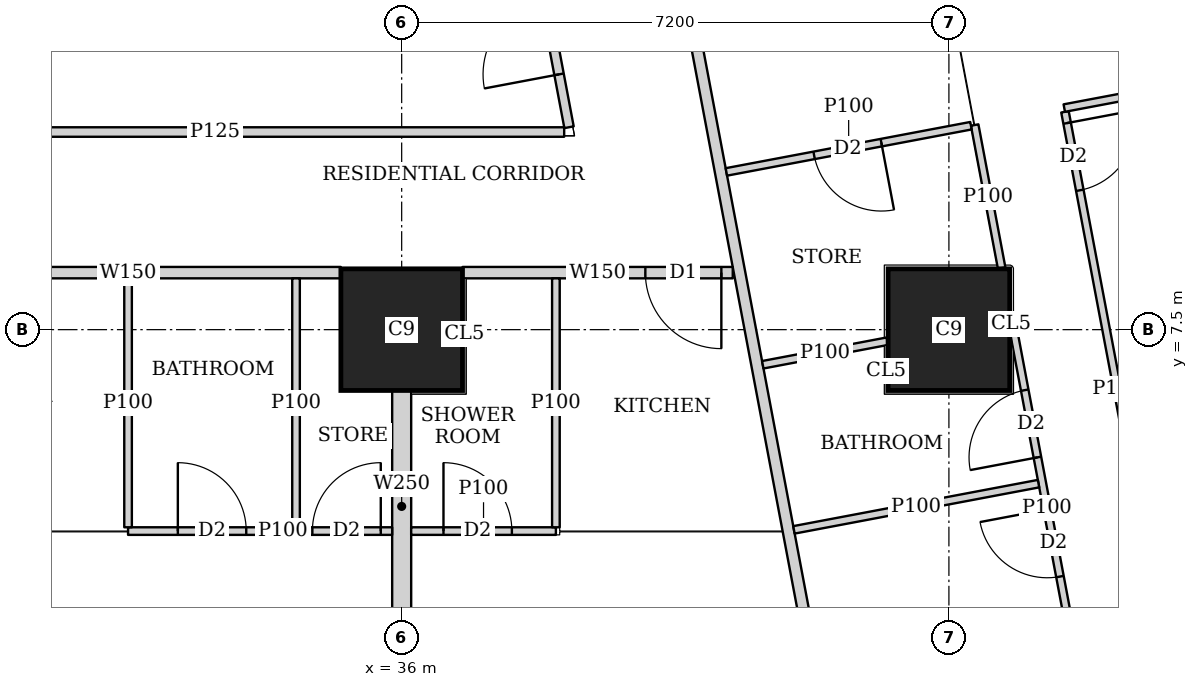
"""IFC4 building model, lengths in metres.
Left out: names, types, materials, properties, quantities, classifications, styles, units other than length and angle.
Written with IfcOpenShell. Run it as: python <this file> out.ifc"""

import sys

from ifc_helpers import new_model, si_unit, direction, frame, frame_2d, origin, origin_2d, place, context, subcontext, project, spatial, rectangle, extrude, element, fill, save


model = new_model("IFC4")
c1 = context("Model", 3, precision=1e-05, world=origin(), true_north=direction((0.0, 1.0)))
c2 = subcontext(c1, "Body", "Model", "MODEL_VIEW")
j1 = project(units=[si_unit("LENGTHUNIT", "METRE"), si_unit("PLANEANGLEUNIT", "RADIAN")], contexts=[c1])
p1 = place(None, origin())
s1 = spatial("IfcSite", under=j1, at=p1, CompositionType="ELEMENT")
p2 = place(p1, origin())
s2 = spatial("IfcBuilding", under=s1, at=p2, CompositionType="ELEMENT")
p3 = place(p2, frame((0.0, 0.0, 122.9)))
s3 = spatial("IfcBuildingStorey", under=s2, at=p3, CompositionType="ELEMENT", Elevation=122.9)
for number, where, z_axis, x_axis in (
    (1, (36.0, 7.5, 0.0), (0.0, 0.0, 1.0), (1.0, 0.0, 0.0)),
    (2, (43.2, 7.5, 0.0), (0.0, 0.0, 1.0), (1.0, 0.0, 0.0)),
):
    element("IfcColumn", number, at=place(p3, frame(where, z_axis=z_axis, x_axis=x_axis)), inside=s3, PredefinedType="COLUMN", context=c2, shape_type="SweptSolid", body=[
        extrude(rectangle(XDim=1.6, YDim=1.6, at=origin_2d()), origin(), (0.0, 0.0, 1.0), 3.75),
    ])
p4 = place(p3, frame((50.653, 2.703, 0.0), z_axis=(0.0, 0.0, 1.0), x_axis=(-0.185612026696, 0.982623109613, 0.0)))
e3 = element("IfcWall", 3, at=p4, inside=s3, PredefinedType="SOLIDWALL", context=c2, shape_type="SweptSolid", body=[
    extrude(rectangle(XDim=41.393, YDim=0.2, at=frame_2d((20.697, 0.0))), origin(), (0.0, 0.0, 1.0), 3.5),
])
p5 = place(p4, frame((1.633, 0.0, 0.9)))
e4 = element("IfcOpeningElement", 4, at=p5, cuts=e3, PredefinedType="OPENING", context=c2, shape_type="SweptSolid", body=[
    extrude(rectangle(XDim=1.8, YDim=1.5, at=frame_2d((0.9, 0.75))), frame((0.0, 0.11, 0.0), z_axis=(0.0, -1.0, 0.0), x_axis=(1.0, 0.0, 0.0)), (0.0, 0.0, 1.0), 0.22),
])
p6 = place(p4, frame((6.032, 0.0, 0.9)))
e5 = element("IfcOpeningElement", 5, at=p6, cuts=e3, PredefinedType="OPENING", context=c2, shape_type="SweptSolid", body=[
    extrude(rectangle(XDim=1.8, YDim=1.5, at=frame_2d((0.9, 0.75))), frame((0.0, 0.11, 0.0), z_axis=(0.0, -1.0, 0.0), x_axis=(1.0, 0.0, 0.0)), (0.0, 0.0, 1.0), 0.22),
])
p7 = place(p4, frame((9.848, 0.0, 0.9)))
e6 = element("IfcOpeningElement", 6, at=p7, cuts=e3, PredefinedType="OPENING", context=c2, shape_type="SweptSolid", body=[
    extrude(rectangle(XDim=1.8, YDim=1.5, at=frame_2d((0.9, 0.75))), frame((0.0, 0.11, 0.0), z_axis=(0.0, -1.0, 0.0), x_axis=(1.0, 0.0, 0.0)), (0.0, 0.0, 1.0), 0.22),
])
p8 = place(p4, frame((13.664, 0.0, 0.9)))
e7 = element("IfcOpeningElement", 7, at=p8, cuts=e3, PredefinedType="OPENING", context=c2, shape_type="SweptSolid", body=[
    extrude(rectangle(XDim=1.8, YDim=1.5, at=frame_2d((0.9, 0.75))), frame((0.0, 0.11, 0.0), z_axis=(0.0, -1.0, 0.0), x_axis=(1.0, 0.0, 0.0)), (0.0, 0.0, 1.0), 0.22),
])
p9 = place(p4, frame((17.481, 0.0, 0.9)))
e8 = element("IfcOpeningElement", 8, at=p9, cuts=e3, PredefinedType="OPENING", context=c2, shape_type="SweptSolid", body=[
    extrude(rectangle(XDim=1.8, YDim=1.5, at=frame_2d((0.9, 0.75))), frame((0.0, 0.11, 0.0), z_axis=(0.0, -1.0, 0.0), x_axis=(1.0, 0.0, 0.0)), (0.0, 0.0, 1.0), 0.22),
])
p10 = place(p4, frame((21.297, 0.0, 0.9)))
e9 = element("IfcOpeningElement", 9, at=p10, cuts=e3, PredefinedType="OPENING", context=c2, shape_type="SweptSolid", body=[
    extrude(rectangle(XDim=1.8, YDim=1.5, at=frame_2d((0.9, 0.75))), frame((0.0, 0.11, 0.0), z_axis=(0.0, -1.0, 0.0), x_axis=(1.0, 0.0, 0.0)), (0.0, 0.0, 1.0), 0.22),
])
p11 = place(p4, frame((25.113, 0.0, 0.9)))
e10 = element("IfcOpeningElement", 10, at=p11, cuts=e3, PredefinedType="OPENING", context=c2, shape_type="SweptSolid", body=[
    extrude(rectangle(XDim=1.8, YDim=1.5, at=frame_2d((0.9, 0.75))), frame((0.0, 0.11, 0.0), z_axis=(0.0, -1.0, 0.0), x_axis=(1.0, 0.0, 0.0)), (0.0, 0.0, 1.0), 0.22),
])
p12 = place(p4, frame((28.93, 0.0, 0.9)))
e11 = element("IfcOpeningElement", 11, at=p12, cuts=e3, PredefinedType="OPENING", context=c2, shape_type="SweptSolid", body=[
    extrude(rectangle(XDim=1.8, YDim=1.5, at=frame_2d((0.9, 0.75))), frame((0.0, 0.11, 0.0), z_axis=(0.0, -1.0, 0.0), x_axis=(1.0, 0.0, 0.0)), (0.0, 0.0, 1.0), 0.22),
])
p13 = place(p4, frame((32.746, 0.0, 0.9)))
e12 = element("IfcOpeningElement", 12, at=p13, cuts=e3, PredefinedType="OPENING", context=c2, shape_type="SweptSolid", body=[
    extrude(rectangle(XDim=1.8, YDim=1.5, at=frame_2d((0.9, 0.75))), frame((0.0, 0.11, 0.0), z_axis=(0.0, -1.0, 0.0), x_axis=(1.0, 0.0, 0.0)), (0.0, 0.0, 1.0), 0.22),
])
p14 = place(p4, frame((36.481, 0.0, 0.9)))
e13 = element("IfcOpeningElement", 13, at=p14, cuts=e3, PredefinedType="OPENING", context=c2, shape_type="SweptSolid", body=[
    extrude(rectangle(XDim=1.8, YDim=1.5, at=frame_2d((0.9, 0.75))), frame((0.0, 0.11, 0.0), z_axis=(0.0, -1.0, 0.0), x_axis=(1.0, 0.0, 0.0)), (0.0, 0.0, 1.0), 0.22),
])
p15 = place(p3, frame((40.356, 8.25, 0.0), z_axis=(0.0, 0.0, 1.0), x_axis=(-1.0, 0.0, 0.0)))
e14 = element("IfcWall", 14, at=p15, inside=s3, PredefinedType="SOLIDWALL", context=c2, shape_type="SweptSolid", body=[
    extrude(rectangle(XDim=3.555, YDim=0.15, at=frame_2d((1.777, 0.0))), origin(), (0.0, 0.0, 1.0), 3.5),
])
p16 = place(p15, frame((0.15, 0.0, 0.0)))
e15 = element("IfcOpeningElement", 15, at=p16, cuts=e14, PredefinedType="OPENING", context=c2, shape_type="SweptSolid", body=[
    extrude(rectangle(XDim=1.0, YDim=2.1, at=frame_2d((0.5, 1.05))), frame((0.0, 0.085, 0.0), z_axis=(0.0, -1.0, 0.0), x_axis=(1.0, 0.0, 0.0)), (0.0, 0.0, 1.0), 0.17),
])
p17 = place(p3, frame((35.199, 8.25, 0.0), z_axis=(0.0, 0.0, 1.0), x_axis=(-1.0, 0.0, 0.0)))
e16 = element("IfcWall", 16, at=p17, inside=s3, PredefinedType="SOLIDWALL", context=c2, shape_type="SweptSolid", body=[
    extrude(rectangle(XDim=5.598, YDim=0.15, at=frame_2d((2.799, 0.0))), origin(), (0.0, 0.0, 1.0), 3.5),
])
p18 = place(p17, frame((3.899, 0.0, 0.0)))
e17 = element("IfcOpeningElement", 17, at=p18, cuts=e16, PredefinedType="OPENING", context=c2, shape_type="SweptSolid", body=[
    extrude(rectangle(XDim=1.0, YDim=2.1, at=frame_2d((0.5, 1.05))), frame((0.0, 0.085, 0.0), z_axis=(0.0, -1.0, 0.0), x_axis=(1.0, 0.0, 0.0)), (0.0, 0.0, 1.0), 0.17),
])
p19 = place(p3, frame((33.382, 45.65, 0.0), z_axis=(0.0, 0.0, 1.0), x_axis=(0.185593544777, -0.982626600565, 0.0)))
e18 = element("IfcWall", 18, at=p19, inside=s3, PredefinedType="SOLIDWALL", context=c2, shape_type="SweptSolid", body=[
    extrude(rectangle(XDim=47.118, YDim=0.15, at=frame_2d((23.559, 0.0))), origin(), (0.0, 0.0, 1.0), 2.2),
])
p20 = place(p19, frame((10.662, 0.0, 0.0)))
e19 = element("IfcOpeningElement", 19, at=p20, cuts=e18, PredefinedType="OPENING", context=c2, shape_type="SweptSolid", body=[
    extrude(rectangle(XDim=1.0, YDim=2.1, at=frame_2d((0.5, 1.05))), frame((0.0, 0.085, 0.0), z_axis=(0.0, -1.0, 0.0), x_axis=(1.0, 0.0, 0.0)), (0.0, 0.0, 1.0), 0.17),
])
p21 = place(p19, frame((15.237, 0.0, 0.0)))
e20 = element("IfcOpeningElement", 20, at=p21, cuts=e18, PredefinedType="OPENING", context=c2, shape_type="SweptSolid", body=[
    extrude(rectangle(XDim=1.0, YDim=2.1, at=frame_2d((0.5, 1.05))), frame((0.0, 0.085, 0.0), z_axis=(0.0, -1.0, 0.0), x_axis=(1.0, 0.0, 0.0)), (0.0, 0.0, 1.0), 0.17),
])
p22 = place(p19, frame((22.87, 0.0, 0.0)))
e21 = element("IfcOpeningElement", 21, at=p22, cuts=e18, PredefinedType="OPENING", context=c2, shape_type="SweptSolid", body=[
    extrude(rectangle(XDim=1.0, YDim=2.1, at=frame_2d((0.5, 1.05))), frame((0.0, 0.085, 0.0), z_axis=(0.0, -1.0, 0.0), x_axis=(1.0, 0.0, 0.0)), (0.0, 0.0, 1.0), 0.17),
])
p23 = place(p19, frame((33.833, 0.0, 0.0)))
e22 = element("IfcOpeningElement", 22, at=p23, cuts=e18, PredefinedType="OPENING", context=c2, shape_type="SweptSolid", body=[
    extrude(rectangle(XDim=1.0, YDim=2.1, at=frame_2d((0.5, 1.05))), frame((0.0, 0.085, 0.0), z_axis=(0.0, -1.0, 0.0), x_axis=(1.0, 0.0, 0.0)), (0.0, 0.0, 1.0), 0.17),
])
p24 = place(p3, frame((35.875, 4.85, 0.0), z_axis=(0.0, 0.0, 1.0), x_axis=(-1.0, 0.0, 0.0)))
e23 = element("IfcWall", 23, at=p24, inside=s3, PredefinedType="PARTITIONING", context=c2, shape_type="SweptSolid", body=[
    extrude(rectangle(XDim=3.475, YDim=0.1, at=frame_2d((1.738, 0.0))), origin(), (0.0, 0.0, 1.0), 3.5),
])
p25 = place(p24, frame((1.92, 0.0, 0.0)))
e24 = element("IfcOpeningElement", 24, at=p25, cuts=e23, PredefinedType="OPENING", context=c2, shape_type="SweptSolid", body=[
    extrude(rectangle(XDim=0.9, YDim=2.1, at=frame_2d((0.45, 1.05))), frame((0.0, 0.06, 0.0), z_axis=(0.0, -1.0, 0.0), x_axis=(1.0, 0.0, 0.0)), (0.0, 0.0, 1.0), 0.12),
])
p26 = place(p24, frame((0.15, 0.0, 0.0)))
e25 = element("IfcOpeningElement", 25, at=p26, cuts=e23, PredefinedType="OPENING", context=c2, shape_type="SweptSolid", body=[
    extrude(rectangle(XDim=0.9, YDim=2.1, at=frame_2d((0.45, 1.05))), frame((0.0, 0.06, 0.0), z_axis=(0.0, -1.0, 0.0), x_axis=(1.0, 0.0, 0.0)), (0.0, 0.0, 1.0), 0.12),
])
for number, where, z_axis, x_axis in (
    (26, (32.4, 4.9, 0.0), (0.0, 0.0, 1.0), (0.0, 1.0, 0.0)),
    (27, (34.61, 4.9, 0.0), (0.0, 0.0, 1.0), (0.0, 1.0, 0.0)),
):
    element("IfcWall", number, at=place(p3, frame(where, z_axis=z_axis, x_axis=x_axis)), inside=s3, PredefinedType="PARTITIONING", context=c2, shape_type="SweptSolid", body=[
        extrude(rectangle(XDim=3.275, YDim=0.1, at=frame_2d((1.638, 0.0))), origin(), (0.0, 0.0, 1.0), 3.5),
    ])
p27 = place(p3, frame((38.029, 4.85, 0.0), z_axis=(0.0, 0.0, 1.0), x_axis=(-1.0, 0.0, 0.0)))
e28 = element("IfcWall", 28, at=p27, inside=s3, PredefinedType="PARTITIONING", context=c2, shape_type="SweptSolid", body=[
    extrude(rectangle(XDim=1.904, YDim=0.1, at=frame_2d((0.952, 0.0))), origin(), (0.0, 0.0, 1.0), 3.5),
])
p28 = place(p27, frame((0.579, 0.0, 0.0)))
e29 = element("IfcOpeningElement", 29, at=p28, cuts=e28, PredefinedType="OPENING", context=c2, shape_type="SweptSolid", body=[
    extrude(rectangle(XDim=0.9, YDim=2.1, at=frame_2d((0.45, 1.05))), frame((0.0, 0.06, 0.0), z_axis=(0.0, -1.0, 0.0), x_axis=(1.0, 0.0, 0.0)), (0.0, 0.0, 1.0), 0.12),
])
p29 = place(p3, frame((38.029, 4.9, 0.0), z_axis=(0.0, 0.0, 1.0), x_axis=(0.0, 1.0, 0.0)))
e30 = element("IfcWall", 30, at=p29, inside=s3, PredefinedType="PARTITIONING", context=c2, shape_type="SweptSolid", body=[
    extrude(rectangle(XDim=3.275, YDim=0.1, at=frame_2d((1.638, 0.0))), origin(), (0.0, 0.0, 1.0), 3.5),
])
p30 = place(p3, frame((36.0, 3.65, 0.0), z_axis=(0.0, 0.0, 1.0), x_axis=(0.0, 1.0, 0.0)))
e31 = element("IfcWall", 31, at=p30, inside=s3, PredefinedType="SOLIDWALL", context=c2, shape_type="SweptSolid", body=[
    extrude(rectangle(XDim=3.049, YDim=0.25, at=frame_2d((1.524, 0.0))), origin(), (0.0, 0.0, 1.0), 3.5),
])
p31 = place(p3, frame((44.727, 10.366, 0.0), z_axis=(0.0, 0.0, 1.0), x_axis=(0.185678775129, -0.982610498858, 0.0)))
e32 = element("IfcWall", 32, at=p31, inside=s3, PredefinedType="PARTITIONING", context=c2, shape_type="SweptSolid", body=[
    extrude(rectangle(XDim=7.421, YDim=0.1, at=frame_2d((3.71, 0.0))), origin(), (0.0, 0.0, 1.0), 3.5),
])
p32 = place(p31, frame((0.151, 0.0, 0.0)))
e33 = element("IfcOpeningElement", 33, at=p32, cuts=e32, PredefinedType="OPENING", context=c2, shape_type="SweptSolid", body=[
    extrude(rectangle(XDim=0.9, YDim=2.1, at=frame_2d((0.45, 1.05))), frame((0.0, 0.06, 0.0), z_axis=(0.0, -1.0, 0.0), x_axis=(1.0, 0.0, 0.0)), (0.0, 0.0, 1.0), 0.12),
])
p33 = place(p31, frame((4.55, 0.0, 0.0)))
e34 = element("IfcOpeningElement", 34, at=p33, cuts=e32, PredefinedType="OPENING", context=c2, shape_type="SweptSolid", body=[
    extrude(rectangle(XDim=0.9, YDim=2.1, at=frame_2d((0.45, 1.05))), frame((0.0, 0.06, 0.0), z_axis=(0.0, -1.0, 0.0), x_axis=(1.0, 0.0, 0.0)), (0.0, 0.0, 1.0), 0.12),
])
p34 = place(p3, frame((43.539, 10.192, 0.0), z_axis=(0.0, 0.0, 1.0), x_axis=(0.185366049966, -0.982669541362, 0.0)))
e35 = element("IfcWall", 35, at=p34, inside=s3, PredefinedType="PARTITIONING", context=c2, shape_type="SweptSolid", body=[
    extrude(rectangle(XDim=1.915, YDim=0.1, at=frame_2d((0.958, 0.0))), origin(), (0.0, 0.0, 1.0), 3.5),
])
p35 = place(p3, frame((44.049, 7.49, 0.0), z_axis=(0.0, 0.0, 1.0), x_axis=(0.185666332607, -0.982612849975, 0.0)))
e36 = element("IfcWall", 36, at=p35, inside=s3, PredefinedType="PARTITIONING", context=c2, shape_type="SweptSolid", body=[
    extrude(rectangle(XDim=4.75, YDim=0.1, at=frame_2d((2.375, 0.0))), origin(), (0.0, 0.0, 1.0), 3.5),
])
p36 = place(p35, frame((0.8, 0.0, 0.0)))
e37 = element("IfcOpeningElement", 37, at=p36, cuts=e36, PredefinedType="OPENING", context=c2, shape_type="SweptSolid", body=[
    extrude(rectangle(XDim=0.9, YDim=2.1, at=frame_2d((0.45, 1.05))), frame((0.0, 0.06, 0.0), z_axis=(0.0, -1.0, 0.0), x_axis=(1.0, 0.0, 0.0)), (0.0, 0.0, 1.0), 0.12),
])
p37 = place(p35, frame((2.396, 0.0, 0.0)))
e38 = element("IfcOpeningElement", 38, at=p37, cuts=e36, PredefinedType="OPENING", context=c2, shape_type="SweptSolid", body=[
    extrude(rectangle(XDim=0.9, YDim=2.1, at=frame_2d((0.45, 1.05))), frame((0.0, 0.06, 0.0), z_axis=(0.0, -1.0, 0.0), x_axis=(1.0, 0.0, 0.0)), (0.0, 0.0, 1.0), 0.12),
])
p38 = place(p3, frame((48.943, 11.213, 0.0), z_axis=(0.0, 0.0, 1.0), x_axis=(-0.982633535512, -0.185556823879, 0.0)))
e39 = element("IfcWall", 39, at=p38, inside=s3, PredefinedType="PARTITIONING", context=c2, shape_type="SweptSolid", body=[
    extrude(rectangle(XDim=4.3, YDim=0.1, at=frame_2d((2.15, 0.0))), origin(), (0.0, 0.0, 1.0), 2.2),
])
p39 = place(p3, frame((43.49, 10.183, 0.0), z_axis=(0.0, 0.0, 1.0), x_axis=(-0.982607026909, -0.185697147715, 0.0)))
e40 = element("IfcWall", 40, at=p39, inside=s3, PredefinedType="PARTITIONING", context=c2, shape_type="SweptSolid", body=[
    extrude(rectangle(XDim=3.275, YDim=0.1, at=frame_2d((1.637, 0.0))), origin(), (0.0, 0.0, 1.0), 3.5),
])
p40 = place(p39, frame((1.2, 0.0, 0.0)))
e41 = element("IfcOpeningElement", 41, at=p40, cuts=e40, PredefinedType="OPENING", context=c2, shape_type="SweptSolid", body=[
    extrude(rectangle(XDim=0.9, YDim=2.1, at=frame_2d((0.45, 1.05))), frame((0.0, 0.06, 0.0), z_axis=(0.0, -1.0, 0.0), x_axis=(1.0, 0.0, 0.0)), (0.0, 0.0, 1.0), 0.12),
])
p41 = place(p3, frame((42.39, 7.348, 0.0), z_axis=(0.0, 0.0, 1.0), x_axis=(-0.9825976927, -0.185746532405, 0.0)))
e42 = element("IfcWall", 42, at=p41, inside=s3, PredefinedType="PARTITIONING", context=c2, shape_type="SweptSolid", body=[
    extrude(rectangle(XDim=1.668, YDim=0.1, at=frame_2d((0.834, 0.0))), origin(), (0.0, 0.0, 1.0), 3.5),
])
p42 = place(p3, frame((44.379, 5.474, 0.0), z_axis=(0.0, 0.0, 1.0), x_axis=(-0.982607026909, -0.185697147715, 0.0)))
e43 = element("IfcWall", 43, at=p42, inside=s3, PredefinedType="PARTITIONING", context=c2, shape_type="SweptSolid", body=[
    extrude(rectangle(XDim=3.275, YDim=0.1, at=frame_2d((1.637, 0.0))), origin(), (0.0, 0.0, 1.0), 3.5),
])
p43 = place(p3, frame((28.95, 10.1, 0.0), z_axis=(0.0, 0.0, 1.0), x_axis=(1.0, 0.0, 0.0)))
e44 = element("IfcWall", 44, at=p43, inside=s3, PredefinedType="PARTITIONING", context=c2, shape_type="SweptSolid", body=[
    extrude(rectangle(XDim=9.188, YDim=0.125, at=frame_2d((4.594, 0.0))), origin(), (0.0, 0.0, 1.0), 3.5),
])
p44 = place(p3, frame((38.202, 10.163, 0.0), z_axis=(0.0, 0.0, 1.0), x_axis=(-0.185610321132, 0.982623431783, 0.0)))
e45 = element("IfcWall", 45, at=p44, inside=s3, PredefinedType="PARTITIONING", context=c2, shape_type="SweptSolid", body=[
    extrude(rectangle(XDim=25.111, YDim=0.125, at=frame_2d((12.556, 0.0))), origin(), (0.0, 0.0, 1.0), 2.5),
])
p45 = place(p44, frame((0.708, 0.0, 0.0)))
e46 = element("IfcOpeningElement", 46, at=p45, cuts=e45, PredefinedType="OPENING", context=c2, shape_type="SweptSolid", body=[
    extrude(rectangle(XDim=1.0, YDim=2.1, at=frame_2d((0.5, 1.05))), frame((0.0, 0.073, 0.0), z_axis=(0.0, -1.0, 0.0), x_axis=(1.0, 0.0, 0.0)), (0.0, 0.0, 1.0), 0.145),
])
p46 = place(p44, frame((13.378, 0.0, 0.0)))
e47 = element("IfcOpeningElement", 47, at=p46, cuts=e45, PredefinedType="OPENING", context=c2, shape_type="SweptSolid", body=[
    extrude(rectangle(XDim=1.0, YDim=2.1, at=frame_2d((0.5, 1.05))), frame((0.0, 0.073, 0.0), z_axis=(0.0, -1.0, 0.0), x_axis=(1.0, 0.0, 0.0)), (0.0, 0.0, 1.0), 0.145),
])
p47 = place(p44, frame((21.25, 0.0, 0.0)))
e48 = element("IfcOpeningElement", 48, at=p47, cuts=e45, PredefinedType="OPENING", context=c2, shape_type="SweptSolid", body=[
    extrude(rectangle(XDim=1.0, YDim=2.1, at=frame_2d((0.5, 1.05))), frame((0.0, 0.073, 0.0), z_axis=(0.0, -1.0, 0.0), x_axis=(1.0, 0.0, 0.0)), (0.0, 0.0, 1.0), 0.145),
])
p48 = place(p44, frame((23.453, 0.0, 0.0)))
e49 = element("IfcOpeningElement", 49, at=p48, cuts=e45, PredefinedType="OPENING", context=c2, shape_type="SweptSolid", body=[
    extrude(rectangle(XDim=1.0, YDim=2.1, at=frame_2d((0.5, 1.05))), frame((0.0, 0.073, 0.0), z_axis=(0.0, -1.0, 0.0), x_axis=(1.0, 0.0, 0.0)), (0.0, 0.0, 1.0), 0.145),
])
p49 = place(p25, origin())
e50 = element("IfcDoor", 50, at=p49, inside=s3, OperationType="SINGLE_SWING_LEFT", PredefinedType="DOOR", context=c2, shape_type="SweptSolid", body=[
    extrude(rectangle(XDim=0.9, YDim=2.1, at=frame_2d((0.45, 1.05))), frame((0.0, 0.025, 0.0), z_axis=(0.0, -1.0, 0.0), x_axis=(1.0, 0.0, 0.0)), (0.0, 0.0, 1.0), 0.05),
])
fill(e24, e50)
p50 = place(p26, origin())
e51 = element("IfcDoor", 51, at=p50, inside=s3, OperationType="SINGLE_SWING_RIGHT", PredefinedType="DOOR", context=c2, shape_type="SweptSolid", body=[
    extrude(rectangle(XDim=0.9, YDim=2.1, at=frame_2d((0.45, 1.05))), frame((0.0, 0.025, 0.0), z_axis=(0.0, -1.0, 0.0), x_axis=(1.0, 0.0, 0.0)), (0.0, 0.0, 1.0), 0.05),
])
fill(e25, e51)
p51 = place(p28, origin())
e52 = element("IfcDoor", 52, at=p51, inside=s3, OperationType="SINGLE_SWING_LEFT", PredefinedType="DOOR", context=c2, shape_type="SweptSolid", body=[
    extrude(rectangle(XDim=0.9, YDim=2.1, at=frame_2d((0.45, 1.05))), frame((0.0, 0.025, 0.0), z_axis=(0.0, -1.0, 0.0), x_axis=(1.0, 0.0, 0.0)), (0.0, 0.0, 1.0), 0.05),
])
fill(e29, e52)
p52 = place(p16, origin())
e53 = element("IfcDoor", 53, at=p52, inside=s3, OperationType="SINGLE_SWING_LEFT", PredefinedType="DOOR", context=c2, shape_type="SweptSolid", body=[
    extrude(rectangle(XDim=1.0, YDim=2.1, at=frame_2d((0.5, 1.05))), frame((0.0, 0.025, 0.0), z_axis=(0.0, -1.0, 0.0), x_axis=(1.0, 0.0, 0.0)), (0.0, 0.0, 1.0), 0.05),
])
fill(e15, e53)
p53 = place(p32, origin())
e54 = element("IfcDoor", 54, at=p53, inside=s3, OperationType="SINGLE_SWING_LEFT", PredefinedType="DOOR", context=c2, shape_type="SweptSolid", body=[
    extrude(rectangle(XDim=0.9, YDim=2.1, at=frame_2d((0.45, 1.05))), frame((0.0, 0.025, 0.0), z_axis=(0.0, -1.0, 0.0), x_axis=(1.0, 0.0, 0.0)), (0.0, 0.0, 1.0), 0.05),
])
fill(e33, e54)
p54 = place(p36, origin())
e55 = element("IfcDoor", 55, at=p54, inside=s3, OperationType="SINGLE_SWING_LEFT", PredefinedType="DOOR", context=c2, shape_type="SweptSolid", body=[
    extrude(rectangle(XDim=0.9, YDim=2.1, at=frame_2d((0.45, 1.05))), frame((0.0, 0.025, 0.0), z_axis=(0.0, -1.0, 0.0), x_axis=(1.0, 0.0, 0.0)), (0.0, 0.0, 1.0), 0.05),
])
fill(e37, e55)
p55 = place(p37, origin())
e56 = element("IfcDoor", 56, at=p55, inside=s3, OperationType="SINGLE_SWING_RIGHT", PredefinedType="DOOR", context=c2, shape_type="SweptSolid", body=[
    extrude(rectangle(XDim=0.9, YDim=2.1, at=frame_2d((0.45, 1.05))), frame((0.0, 0.025, 0.0), z_axis=(0.0, -1.0, 0.0), x_axis=(1.0, 0.0, 0.0)), (0.0, 0.0, 1.0), 0.05),
])
fill(e38, e56)
p56 = place(p40, origin())
e57 = element("IfcDoor", 57, at=p56, inside=s3, OperationType="SINGLE_SWING_LEFT", PredefinedType="DOOR", context=c2, shape_type="SweptSolid", body=[
    extrude(rectangle(XDim=0.9, YDim=2.1, at=frame_2d((0.45, 1.05))), frame((0.0, 0.025, 0.0), z_axis=(0.0, -1.0, 0.0), x_axis=(1.0, 0.0, 0.0)), (0.0, 0.0, 1.0), 0.05),
])
fill(e41, e57)
p57 = place(p45, origin())
e58 = element("IfcDoor", 58, at=p57, inside=s3, OperationType="SINGLE_SWING_LEFT", PredefinedType="DOOR", context=c2, shape_type="SweptSolid", body=[
    extrude(rectangle(XDim=1.0, YDim=2.1, at=frame_2d((0.5, 1.05))), frame((0.0, 0.025, 0.0), z_axis=(0.0, -1.0, 0.0), x_axis=(1.0, 0.0, 0.0)), (0.0, 0.0, 1.0), 0.05),
])
fill(e46, e58)
save(model, sys.argv[1])
